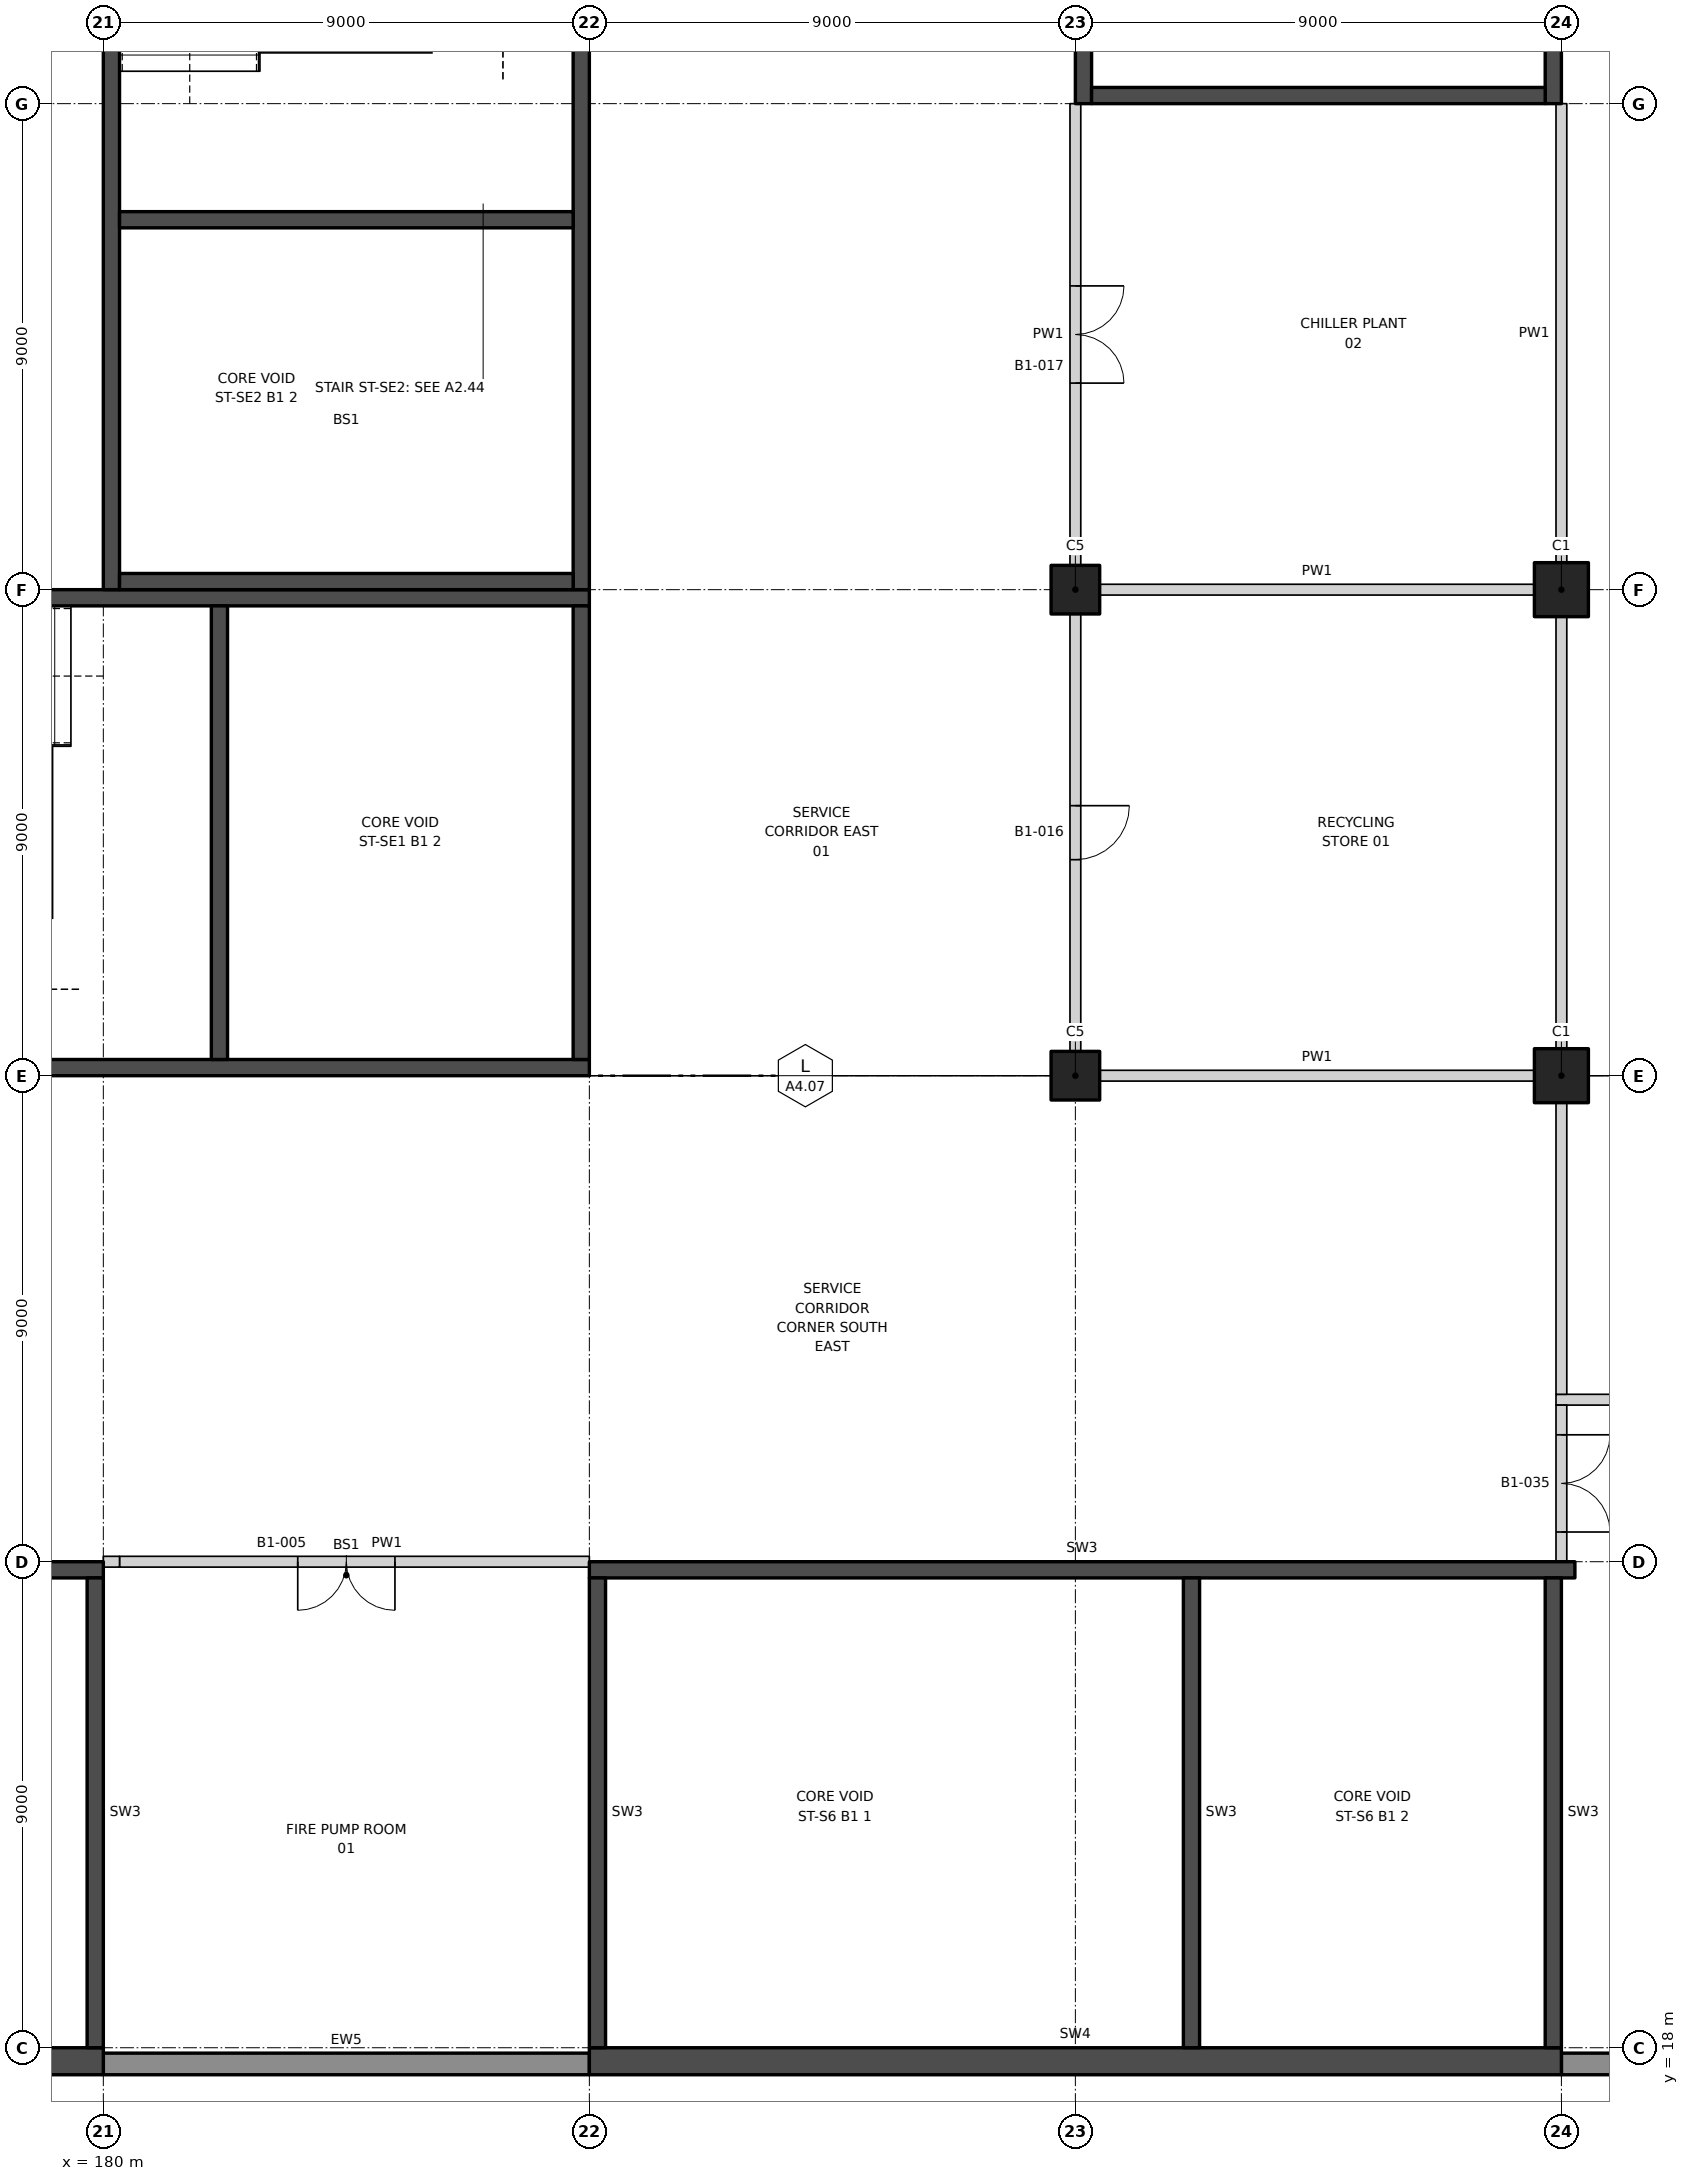
"""IFC4 building model, lengths in metres.
Left out: names, types, materials, properties, quantities, classifications, styles, units other than length and angle.
Written with IfcOpenShell. Run it as: python <this file> out.ifc"""

import sys

from ifc_helpers import new_model, si_unit, direction, frame, frame_2d, origin, origin_2d, place, context, subcontext, project, spatial, rectangle, extrude, element, fill, save


model = new_model("IFC4")
c1 = context("Model", 3, precision=1e-05, world=origin(), true_north=direction((0.0, 1.0)))
c2 = subcontext(c1, "Body", "Model", "MODEL_VIEW")
j1 = project(units=[si_unit("LENGTHUNIT", "METRE"), si_unit("PLANEANGLEUNIT", "RADIAN")], contexts=[c1])
p1 = place(None, origin())
s1 = spatial("IfcSite", under=j1, at=p1, CompositionType="ELEMENT")
p2 = place(p1, origin())
s2 = spatial("IfcBuilding", under=s1, at=p2, CompositionType="ELEMENT")
p3 = place(p2, frame((0.0, 0.0, -6.0)))
s3 = spatial("IfcBuildingStorey", under=s2, at=p3, CompositionType="ELEMENT", Elevation=-6.0)
for number, where, z_axis, x_axis in (
    (1, (207.0, 36.0, 0.0), (0.0, 0.0, 1.0), (1.0, 0.0, 0.0)),
    (2, (207.0, 45.0, 0.0), (0.0, 0.0, 1.0), (1.0, 0.0, 0.0)),
):
    element("IfcColumn", number, at=place(p3, frame(where, z_axis=z_axis, x_axis=x_axis)), inside=s3, PredefinedType="COLUMN", context=c2, shape_type="SweptSolid", body=[
        extrude(rectangle(XDim=1.0, YDim=1.0, at=origin_2d()), origin(), (0.0, 0.0, 1.0), 6.0),
    ])
for number, where, z_axis, x_axis in (
    (3, (198.0, 36.0, 0.0), (0.0, 0.0, 1.0), (1.0, 0.0, 0.0)),
    (4, (198.0, 45.0, 0.0), (0.0, 0.0, 1.0), (1.0, 0.0, 0.0)),
):
    element("IfcColumn", number, at=place(p3, frame(where, z_axis=z_axis, x_axis=x_axis)), inside=s3, PredefinedType="COLUMN", context=c2, shape_type="SweptSolid", body=[
        extrude(rectangle(XDim=0.9, YDim=0.9, at=origin_2d()), origin(), (0.0, 0.0, 1.0), 6.0),
    ])
p4 = place(p3, frame((180.3, 27.0, 0.0), z_axis=(0.0, 0.0, 1.0), x_axis=(1.0, 0.0, 0.0)))
e5 = element("IfcWall", 5, at=p4, inside=s3, PredefinedType="PARTITIONING", context=c2, shape_type="SweptSolid", body=[
    extrude(rectangle(XDim=8.7, YDim=0.2, at=frame_2d((4.35, 0.0))), origin(), (0.0, 0.0, 1.0), 4.55),
])
p5 = place(p4, frame((3.3, 0.0, 0.0)))
e6 = element("IfcOpeningElement", 6, at=p5, cuts=e5, PredefinedType="OPENING", context=c2, shape_type="SweptSolid", body=[
    extrude(rectangle(XDim=1.8, YDim=2.1, at=frame_2d((0.9, 1.05))), frame((0.0, 0.11, 0.0), z_axis=(0.0, -1.0, 0.0), x_axis=(1.0, 0.0, 0.0)), (0.0, 0.0, 1.0), 0.22),
])
p6 = place(p3, frame((206.9, 30.0, 0.0), z_axis=(0.0, 0.0, 1.0), x_axis=(1.0, 0.0, 0.0)))
e7 = element("IfcWall", 7, at=p6, inside=s3, PredefinedType="PARTITIONING", context=c2, shape_type="SweptSolid", body=[
    extrude(rectangle(XDim=18.1, YDim=0.2, at=frame_2d((9.05, 0.0))), origin(), (0.0, 0.0, 1.0), 6.0),
])
p7 = place(p6, frame((16.1, 0.0, 0.0)))
e8 = element("IfcOpeningElement", 8, at=p7, cuts=e7, PredefinedType="OPENING", context=c2, shape_type="SweptSolid", body=[
    extrude(rectangle(XDim=1.8, YDim=2.1, at=frame_2d((0.9, 1.05))), frame((0.0, 0.11, 0.0), z_axis=(0.0, -1.0, 0.0), x_axis=(1.0, 0.0, 0.0)), (0.0, 0.0, 1.0), 0.22),
])
for number, where, z_axis, x_axis in (
    (9, (198.45, 36.0, 0.0), (0.0, 0.0, 1.0), (1.0, 0.0, 0.0)),
    (10, (198.45, 45.0, 0.0), (0.0, 0.0, 1.0), (1.0, 0.0, 0.0)),
):
    element("IfcWall", number, at=place(p3, frame(where, z_axis=z_axis, x_axis=x_axis)), inside=s3, PredefinedType="PARTITIONING", context=c2, shape_type="SweptSolid", body=[
        extrude(rectangle(XDim=8.05, YDim=0.2, at=frame_2d((4.025, 0.0))), origin(), (0.0, 0.0, 1.0), 4.65),
    ])
p8 = place(p3, frame((198.0, 36.45, 0.0), z_axis=(0.0, 0.0, 1.0), x_axis=(0.0, 1.0, 0.0)))
e11 = element("IfcWall", 11, at=p8, inside=s3, PredefinedType="PARTITIONING", context=c2, shape_type="SweptSolid", body=[
    extrude(rectangle(XDim=8.1, YDim=0.2, at=frame_2d((4.05, 0.0))), origin(), (0.0, 0.0, 1.0), 4.65),
])
p9 = place(p8, frame((3.55, 0.0, 0.0)))
e12 = element("IfcOpeningElement", 12, at=p9, cuts=e11, PredefinedType="OPENING", context=c2, shape_type="SweptSolid", body=[
    extrude(rectangle(XDim=1.0, YDim=2.1, at=frame_2d((0.5, 1.05))), frame((0.0, 0.11, 0.0), z_axis=(0.0, -1.0, 0.0), x_axis=(1.0, 0.0, 0.0)), (0.0, 0.0, 1.0), 0.22),
])
p10 = place(p3, frame((198.0, 45.45, 0.0), z_axis=(0.0, 0.0, 1.0), x_axis=(0.0, 1.0, 0.0)))
e13 = element("IfcWall", 13, at=p10, inside=s3, PredefinedType="PARTITIONING", context=c2, shape_type="SweptSolid", body=[
    extrude(rectangle(XDim=8.55, YDim=0.2, at=frame_2d((4.275, 0.0))), origin(), (0.0, 0.0, 1.0), 4.55),
])
p11 = place(p10, frame((3.375, 0.0, 0.0)))
e14 = element("IfcOpeningElement", 14, at=p11, cuts=e13, PredefinedType="OPENING", context=c2, shape_type="SweptSolid", body=[
    extrude(rectangle(XDim=1.8, YDim=2.1, at=frame_2d((0.9, 1.05))), frame((0.0, 0.11, 0.0), z_axis=(0.0, -1.0, 0.0), x_axis=(1.0, 0.0, 0.0)), (0.0, 0.0, 1.0), 0.22),
])
p12 = place(p3, frame((207.0, 27.0, 0.0), z_axis=(0.0, 0.0, 1.0), x_axis=(0.0, 1.0, 0.0)))
e15 = element("IfcWall", 15, at=p12, inside=s3, PredefinedType="PARTITIONING", context=c2, shape_type="SweptSolid", body=[
    extrude(rectangle(XDim=2.9, YDim=0.2, at=frame_2d((1.45, 0.0))), origin(), (0.0, 0.0, 1.0), 4.65),
])
p13 = place(p12, frame((0.55, 0.0, 0.0)))
e16 = element("IfcOpeningElement", 16, at=p13, cuts=e15, PredefinedType="OPENING", context=c2, shape_type="SweptSolid", body=[
    extrude(rectangle(XDim=1.8, YDim=2.1, at=frame_2d((0.9, 1.05))), frame((0.0, 0.11, 0.0), z_axis=(0.0, -1.0, 0.0), x_axis=(1.0, 0.0, 0.0)), (0.0, 0.0, 1.0), 0.22),
])
p14 = place(p3, frame((207.0, 30.1, 0.0), z_axis=(0.0, 0.0, 1.0), x_axis=(0.0, 1.0, 0.0)))
e17 = element("IfcWall", 17, at=p14, inside=s3, PredefinedType="PARTITIONING", context=c2, shape_type="SweptSolid", body=[
    extrude(rectangle(XDim=5.4, YDim=0.2, at=frame_2d((2.7, 0.0))), origin(), (0.0, 0.0, 1.0), 4.65),
])
p15 = place(p3, frame((207.0, 36.5, 0.0), z_axis=(0.0, 0.0, 1.0), x_axis=(0.0, 1.0, 0.0)))
e18 = element("IfcWall", 18, at=p15, inside=s3, PredefinedType="PARTITIONING", context=c2, shape_type="SweptSolid", body=[
    extrude(rectangle(XDim=8.0, YDim=0.2, at=frame_2d((4.0, 0.0))), origin(), (0.0, 0.0, 1.0), 4.65),
])
p16 = place(p3, frame((207.0, 45.5, 0.0), z_axis=(0.0, 0.0, 1.0), x_axis=(0.0, 1.0, 0.0)))
e19 = element("IfcWall", 19, at=p16, inside=s3, PredefinedType="PARTITIONING", context=c2, shape_type="SweptSolid", body=[
    extrude(rectangle(XDim=8.5, YDim=0.2, at=frame_2d((4.25, 0.0))), origin(), (0.0, 0.0, 1.0), 4.65),
])
p17 = place(p3, frame((180.0, 17.7, 0.0), z_axis=(0.0, 0.0, 1.0), x_axis=(1.0, 0.0, 0.0)))
e20 = element("IfcWall", 20, at=p17, inside=s3, PredefinedType="SOLIDWALL", context=c2, shape_type="SweptSolid", body=[
    extrude(rectangle(XDim=9.0, YDim=0.4, at=frame_2d((4.5, 0.0))), origin(), (0.0, 0.0, 1.0), 6.0),
])
p18 = place(p3, frame((207.0, 17.7, 0.0), z_axis=(0.0, 0.0, 1.0), x_axis=(1.0, 0.0, 0.0)))
e21 = element("IfcWall", 21, at=p18, inside=s3, PredefinedType="SOLIDWALL", context=c2, shape_type="SweptSolid", body=[
    extrude(rectangle(XDim=8.55, YDim=0.4, at=frame_2d((4.275, 0.0))), origin(), (0.0, 0.0, 1.0), 6.0),
])
p19 = place(p3, frame((180.0, 26.85, 0.0), z_axis=(0.0, 0.0, 1.0), x_axis=(-1.0, 0.0, 0.0)))
e22 = element("IfcWall", 22, at=p19, inside=s3, PredefinedType="SHEAR", context=c2, shape_type="SweptSolid", body=[
    extrude(rectangle(XDim=18.0, YDim=0.3, at=frame_2d((9.0, 0.0))), origin(), (0.0, 0.0, 1.0), 6.0),
])
p20 = place(p3, frame((180.0, 17.75, 0.0), z_axis=(0.0, 0.0, 1.0), x_axis=(-1.0, 0.0, 0.0)))
e23 = element("IfcWall", 23, at=p20, inside=s3, PredefinedType="SHEAR", context=c2, shape_type="SweptSolid", body=[
    extrude(rectangle(XDim=18.0, YDim=0.5, at=frame_2d((9.0, 0.0))), origin(), (0.0, 0.0, 1.0), 6.0),
])
p21 = place(p3, frame((179.85, 26.7, 0.0), z_axis=(0.0, 0.0, 1.0), x_axis=(0.0, -1.0, 0.0)))
e24 = element("IfcWall", 24, at=p21, inside=s3, PredefinedType="SHEAR", context=c2, shape_type="SweptSolid", body=[
    extrude(rectangle(XDim=8.7, YDim=0.3, at=frame_2d((4.35, 0.0))), origin(), (0.0, 0.0, 1.0), 6.0),
])
p22 = place(p3, frame((189.0, 26.85, 0.0), z_axis=(0.0, 0.0, 1.0), x_axis=(1.0, 0.0, 0.0)))
e25 = element("IfcWall", 25, at=p22, inside=s3, PredefinedType="SHEAR", context=c2, shape_type="SweptSolid", body=[
    extrude(rectangle(XDim=18.25, YDim=0.3, at=frame_2d((9.125, 0.0))), origin(), (0.0, 0.0, 1.0), 6.0),
])
p23 = place(p3, frame((189.0, 17.75, 0.0), z_axis=(0.0, 0.0, 1.0), x_axis=(1.0, 0.0, 0.0)))
e26 = element("IfcWall", 26, at=p23, inside=s3, PredefinedType="SHEAR", context=c2, shape_type="SweptSolid", body=[
    extrude(rectangle(XDim=18.0, YDim=0.5, at=frame_2d((9.0, 0.0))), origin(), (0.0, 0.0, 1.0), 6.0),
])
for number, where, z_axis, x_axis in (
    (27, (189.15, 26.7, 0.0), (0.0, 0.0, 1.0), (0.0, -1.0, 0.0)),
    (28, (206.85, 26.7, 0.0), (0.0, 0.0, 1.0), (0.0, -1.0, 0.0)),
    (29, (200.15, 26.7, 0.0), (0.0, 0.0, 1.0), (0.0, -1.0, 0.0)),
):
    element("IfcWall", number, at=place(p3, frame(where, z_axis=z_axis, x_axis=x_axis)), inside=s3, PredefinedType="SHEAR", context=c2, shape_type="SweptSolid", body=[
        extrude(rectangle(XDim=8.7, YDim=0.3, at=frame_2d((4.35, 0.0))), origin(), (0.0, 0.0, 1.0), 6.0),
    ])
p24 = place(p3, frame((198.15, 54.0, 0.0), z_axis=(0.0, 0.0, 1.0), x_axis=(0.0, 1.0, 0.0)))
e30 = element("IfcWall", 30, at=p24, inside=s3, PredefinedType="SHEAR", context=c2, shape_type="SweptSolid", body=[
    extrude(rectangle(XDim=18.0, YDim=0.3, at=frame_2d((9.0, 0.0))), origin(), (0.0, 0.0, 1.0), 6.0),
])
p25 = place(p24, frame((8.6, 0.0, 0.0)))
e31 = element("IfcOpeningElement", 31, at=p25, cuts=e30, PredefinedType="OPENING", context=c2, shape_type="SweptSolid", body=[
    extrude(rectangle(XDim=1.2, YDim=2.1, at=frame_2d((0.6, 1.05))), frame((0.0, 0.16, 0.0), z_axis=(0.0, -1.0, 0.0), x_axis=(1.0, 0.0, 0.0)), (0.0, 0.0, 1.0), 0.32),
])
p26 = place(p3, frame((206.85, 54.0, 0.0), z_axis=(0.0, 0.0, 1.0), x_axis=(0.0, 1.0, 0.0)))
e32 = element("IfcWall", 32, at=p26, inside=s3, PredefinedType="SHEAR", context=c2, shape_type="SweptSolid", body=[
    extrude(rectangle(XDim=18.0, YDim=0.3, at=frame_2d((9.0, 0.0))), origin(), (0.0, 0.0, 1.0), 6.0),
])
p27 = place(p3, frame((198.3, 54.15, 0.0), z_axis=(0.0, 0.0, 1.0), x_axis=(1.0, 0.0, 0.0)))
e33 = element("IfcWall", 33, at=p27, inside=s3, PredefinedType="SHEAR", context=c2, shape_type="SweptSolid", body=[
    extrude(rectangle(XDim=8.4, YDim=0.3, at=frame_2d((4.2, 0.0))), origin(), (0.0, 0.0, 1.0), 6.0),
])
p28 = place(p3, frame((170.75, 44.85, 0.0), z_axis=(0.0, 0.0, 1.0), x_axis=(1.0, 0.0, 0.0)))
e34 = element("IfcWall", 34, at=p28, inside=s3, PredefinedType="SHEAR", context=c2, shape_type="SweptSolid", body=[
    extrude(rectangle(XDim=18.25, YDim=0.3, at=frame_2d((9.125, 0.0))), origin(), (0.0, 0.0, 1.0), 6.0),
])
p29 = place(p28, frame((1.75, 0.0, 0.0)))
e35 = element("IfcOpeningElement", 35, at=p29, cuts=e34, PredefinedType="OPENING", context=c2, shape_type="SweptSolid", body=[
    extrude(rectangle(XDim=1.2, YDim=2.1, at=frame_2d((0.6, 1.05))), frame((0.0, 0.16, 0.0), z_axis=(0.0, -1.0, 0.0), x_axis=(1.0, 0.0, 0.0)), (0.0, 0.0, 1.0), 0.32),
])
p30 = place(p3, frame((171.0, 36.15, 0.0), z_axis=(0.0, 0.0, 1.0), x_axis=(1.0, 0.0, 0.0)))
e36 = element("IfcWall", 36, at=p30, inside=s3, PredefinedType="SHEAR", context=c2, shape_type="SweptSolid", body=[
    extrude(rectangle(XDim=18.0, YDim=0.3, at=frame_2d((9.0, 0.0))), origin(), (0.0, 0.0, 1.0), 6.0),
])
for number, where, z_axis, x_axis in (
    (37, (188.85, 44.7, 0.0), (0.0, 0.0, 1.0), (0.0, -1.0, 0.0)),
    (38, (182.15, 44.7, 0.0), (0.0, 0.0, 1.0), (0.0, -1.0, 0.0)),
):
    element("IfcWall", number, at=place(p3, frame(where, z_axis=z_axis, x_axis=x_axis)), inside=s3, PredefinedType="SHEAR", context=c2, shape_type="SweptSolid", body=[
        extrude(rectangle(XDim=8.4, YDim=0.3, at=frame_2d((4.2, 0.0))), origin(), (0.0, 0.0, 1.0), 6.0),
    ])
p31 = place(p3, frame((180.15, 63.0, 0.0), z_axis=(0.0, 0.0, 1.0), x_axis=(0.0, -1.0, 0.0)))
e39 = element("IfcWall", 39, at=p31, inside=s3, PredefinedType="SHEAR", context=c2, shape_type="SweptSolid", body=[
    extrude(rectangle(XDim=18.0, YDim=0.3, at=frame_2d((9.0, 0.0))), origin(), (0.0, 0.0, 1.0), 6.0),
])
p32 = place(p31, frame((1.5, 0.0, 0.0)))
e40 = element("IfcOpeningElement", 40, at=p32, cuts=e39, PredefinedType="OPENING", context=c2, shape_type="SweptSolid", body=[
    extrude(rectangle(XDim=1.2, YDim=2.1, at=frame_2d((0.6, 1.05))), frame((0.0, 0.16, 0.0), z_axis=(0.0, -1.0, 0.0), x_axis=(1.0, 0.0, 0.0)), (0.0, 0.0, 1.0), 0.32),
])
p33 = place(p3, frame((188.85, 63.0, 0.0), z_axis=(0.0, 0.0, 1.0), x_axis=(0.0, -1.0, 0.0)))
e41 = element("IfcWall", 41, at=p33, inside=s3, PredefinedType="SHEAR", context=c2, shape_type="SweptSolid", body=[
    extrude(rectangle(XDim=18.0, YDim=0.3, at=frame_2d((9.0, 0.0))), origin(), (0.0, 0.0, 1.0), 6.0),
])
for number, where, z_axis, x_axis in (
    (42, (180.3, 45.15, 0.0), (0.0, 0.0, 1.0), (1.0, 0.0, 0.0)),
    (43, (180.3, 51.85, 0.0), (0.0, 0.0, 1.0), (1.0, 0.0, 0.0)),
):
    element("IfcWall", number, at=place(p3, frame(where, z_axis=z_axis, x_axis=x_axis)), inside=s3, PredefinedType="SHEAR", context=c2, shape_type="SweptSolid", body=[
        extrude(rectangle(XDim=8.4, YDim=0.3, at=frame_2d((4.2, 0.0))), origin(), (0.0, 0.0, 1.0), 6.0),
    ])
p34 = place(p3, frame((180.0, 27.0, 0.0), z_axis=(0.0, 0.0, 1.0), x_axis=(1.0, 0.0, 0.0)))
e44 = element("IfcWall", 44, at=p34, inside=s3, PredefinedType="PARTITIONING", context=c2, shape_type="SweptSolid", body=[
    extrude(rectangle(XDim=0.3, YDim=0.2, at=frame_2d((0.15, 0.0))), origin(), (0.0, 0.0, 1.0), 6.0),
])
p35 = place(p5, frame((1.8, 0.0, 0.0), z_axis=(0.0, 0.0, 1.0), x_axis=(-1.0, 0.0, 0.0)))
e45 = element("IfcDoor", 45, at=p35, inside=s3, OperationType="DOUBLE_DOOR_DOUBLE_SWING", PredefinedType="DOOR", context=c2, shape_type="SweptSolid", body=[
    extrude(rectangle(XDim=1.8, YDim=2.1, at=frame_2d((0.9, 1.05))), frame((0.0, 0.025, 0.0), z_axis=(0.0, -1.0, 0.0), x_axis=(1.0, 0.0, 0.0)), (0.0, 0.0, 1.0), 0.05),
])
fill(e6, e45)
p36 = place(p9, frame((1.0, 0.0, 0.0), z_axis=(0.0, 0.0, 1.0), x_axis=(-1.0, 0.0, 0.0)))
e46 = element("IfcDoor", 46, at=p36, inside=s3, OperationType="SINGLE_SWING_LEFT", PredefinedType="DOOR", context=c2, shape_type="SweptSolid", body=[
    extrude(rectangle(XDim=1.0, YDim=2.1, at=frame_2d((0.5, 1.05))), frame((0.0, 0.025, 0.0), z_axis=(0.0, -1.0, 0.0), x_axis=(1.0, 0.0, 0.0)), (0.0, 0.0, 1.0), 0.05),
])
fill(e12, e46)
p37 = place(p11, frame((1.8, 0.0, 0.0), z_axis=(0.0, 0.0, 1.0), x_axis=(-1.0, 0.0, 0.0)))
e47 = element("IfcDoor", 47, at=p37, inside=s3, OperationType="DOUBLE_DOOR_DOUBLE_SWING", PredefinedType="DOOR", context=c2, shape_type="SweptSolid", body=[
    extrude(rectangle(XDim=1.8, YDim=2.1, at=frame_2d((0.9, 1.05))), frame((0.0, 0.025, 0.0), z_axis=(0.0, -1.0, 0.0), x_axis=(1.0, 0.0, 0.0)), (0.0, 0.0, 1.0), 0.05),
])
fill(e14, e47)
p38 = place(p13, frame((1.8, 0.0, 0.0), z_axis=(0.0, 0.0, 1.0), x_axis=(-1.0, 0.0, 0.0)))
e48 = element("IfcDoor", 48, at=p38, inside=s3, OperationType="DOUBLE_DOOR_DOUBLE_SWING", PredefinedType="DOOR", context=c2, shape_type="SweptSolid", body=[
    extrude(rectangle(XDim=1.8, YDim=2.1, at=frame_2d((0.9, 1.05))), frame((0.0, 0.025, 0.0), z_axis=(0.0, -1.0, 0.0), x_axis=(1.0, 0.0, 0.0)), (0.0, 0.0, 1.0), 0.05),
])
fill(e16, e48)
save(model, sys.argv[1])
